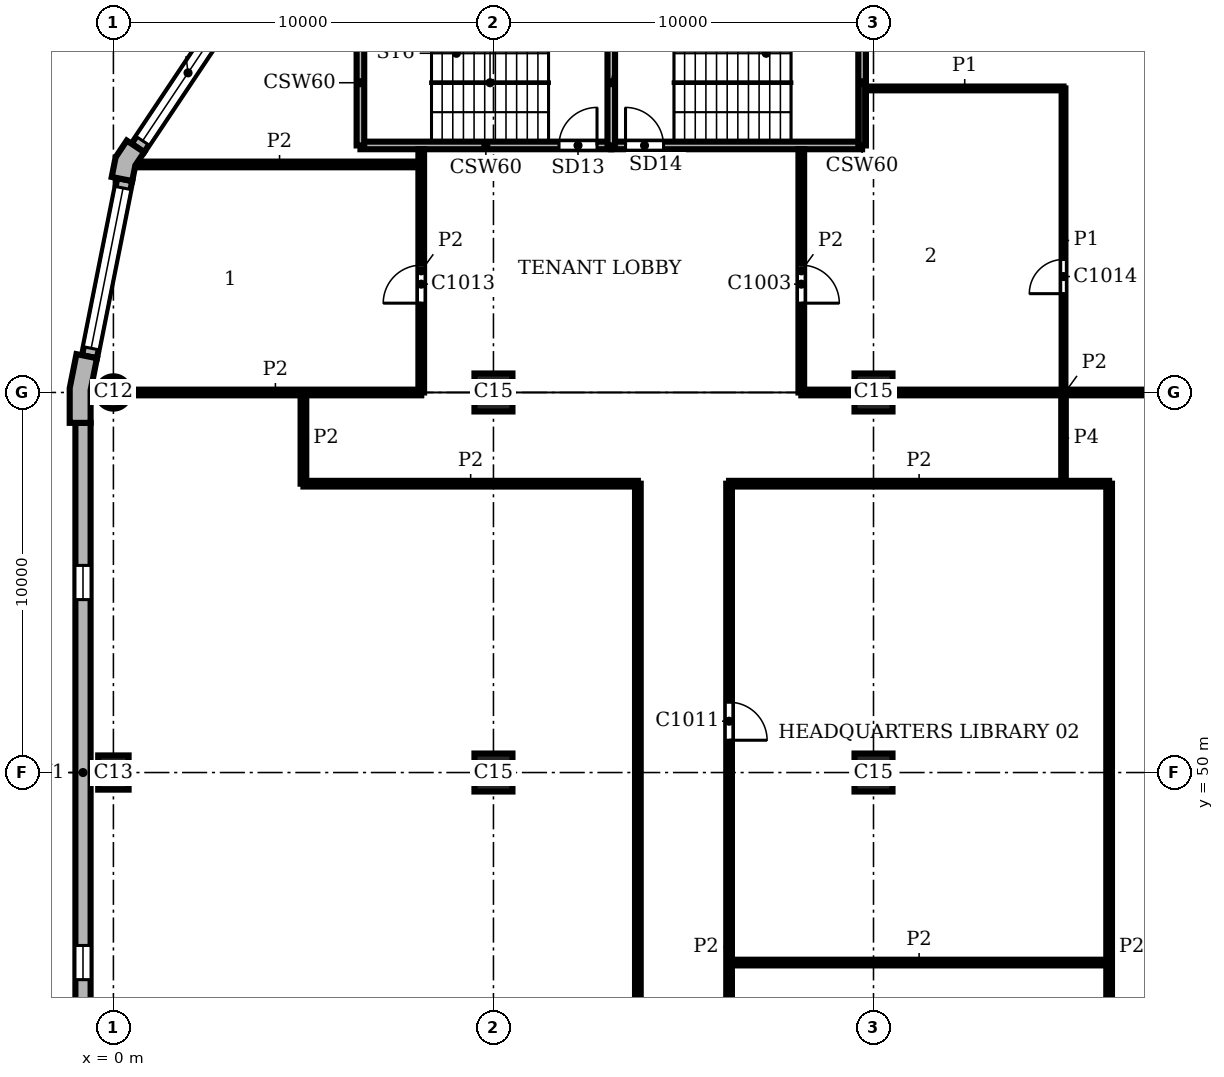
"""IFC4 building model, lengths in metres.
Left out: names, types, materials, properties, quantities, classifications, styles, units other than length and angle.
Written with IfcOpenShell. Run it as: python <this file> out.ifc"""

import sys

from ifc_helpers import new_model, si_unit, direction, frame, frame_2d, origin, origin_2d, place, context, subcontext, project, spatial, polyline, rectangle, circle, outline, extrude, element, fill, save


model = new_model("IFC4")
c1 = context("Model", 3, precision=1e-05, world=origin(), true_north=direction((0.0, 1.0)))
c2 = subcontext(c1, "Body", "Model", "MODEL_VIEW")
j1 = project(units=[si_unit("LENGTHUNIT", "METRE"), si_unit("PLANEANGLEUNIT", "RADIAN")], contexts=[c1])
p1 = place(None, origin())
s1 = spatial("IfcSite", under=j1, at=p1, CompositionType="ELEMENT")
p2 = place(p1, origin())
s2 = spatial("IfcBuilding", under=s1, at=p2, CompositionType="ELEMENT")
p3 = place(p2, frame((0.0, 0.0, 341.1)))
s3 = spatial("IfcBuildingStorey", under=s2, at=p3, CompositionType="ELEMENT", Elevation=341.1)
p4 = place(p3, frame((0.0, 60.0, 0.0), z_axis=(0.0, 0.0, 1.0), x_axis=(1.0, 0.0, 0.0)))
e1 = element("IfcColumn", 1, at=p4, inside=s3, PredefinedType="COLUMN", context=c2, shape_type="SweptSolid", body=[
    extrude(circle(Radius=0.425, at=origin_2d()), origin(), (0.0, 0.0, 1.0), 3.9),
])
p5 = place(p3, frame((0.0, 50.0, 0.0), z_axis=(0.0, 0.0, 1.0), x_axis=(0.0, 1.0, 0.0)))
e2 = element("IfcColumn", 2, at=p5, inside=s3, PredefinedType="COLUMN", context=c2, shape_type="SweptSolid", body=[
    extrude(rectangle(XDim=0.9, YDim=0.8, at=origin_2d()), origin(), (0.0, 0.0, 1.0), 3.9),
])
for number, where, z_axis, x_axis in (
    (3, (10.0, 50.0, 0.0), (0.0, 0.0, 1.0), (1.0, 0.0, 0.0)),
    (4, (10.0, 60.0, 0.0), (0.0, 0.0, 1.0), (1.0, 0.0, 0.0)),
    (5, (20.0, 50.0, 0.0), (0.0, 0.0, 1.0), (1.0, 0.0, 0.0)),
    (6, (20.0, 60.0, 0.0), (0.0, 0.0, 1.0), (1.0, 0.0, 0.0)),
):
    element("IfcColumn", number, at=place(p3, frame(where, z_axis=z_axis, x_axis=x_axis)), inside=s3, PredefinedType="COLUMN", context=c2, shape_type="SweptSolid", body=[
        extrude(rectangle(XDim=1.0, YDim=1.0, at=origin_2d()), origin(), (0.0, 0.0, 1.0), 3.9),
    ])
p6 = place(p3, origin())
e7 = element("IfcWall", 7, at=p6, inside=s3, PredefinedType="SOLIDWALL", context=c2, shape_type="SweptSolid", body=[
    extrude(outline(polyline([(0.477, 66.545), (0.352, 66.629), (0.059, 66.189), (-0.045, 65.67), (0.103, 65.641), (0.495, 65.563), (0.577, 65.974), (0.81, 66.323), (0.477, 66.545)])), origin(), (0.0, 0.0, 1.0), 3.9),
])
e8 = element("IfcWall", 8, at=p6, inside=s3, PredefinedType="SOLIDWALL", context=c2, shape_type="SweptSolid", body=[
    extrude(outline(polyline([(-0.825, 60.98), (-0.972, 61.009), (-1.15, 60.113), (-1.15, 59.2), (-1.0, 59.2), (-0.6, 59.2), (-0.6, 60.059), (-0.432, 60.902), (-0.825, 60.98)])), origin(), (0.0, 0.0, 1.0), 3.9),
])
p7 = place(p3, frame((29.357, 66.434, 0.0), z_axis=(0.0, 0.0, 1.0), x_axis=(-0.555541552266, 0.831488775454, 0.0)))
e9 = element("IfcWall", 9, at=p7, inside=s3, PredefinedType="SOLIDWALL", context=c2, shape_type="SweptSolid", body=[
    extrude(rectangle(XDim=4.753, YDim=0.4, at=frame_2d((2.376, 0.0))), origin(), (0.0, 0.0, 1.0), 3.9),
])
p8 = place(p7, frame((0.226, 0.0, 0.9)))
e10 = element("IfcOpeningElement", 10, at=p8, cuts=e9, PredefinedType="OPENING", context=c2, shape_type="SweptSolid", body=[
    extrude(rectangle(XDim=4.3, YDim=2.35, at=frame_2d((2.15, 1.175))), frame((0.0, 0.21, 0.0), z_axis=(0.0, -1.0, 0.0), x_axis=(1.0, 0.0, 0.0)), (0.0, 0.0, 1.0), 0.42),
])
p9 = place(p3, frame((3.284, 70.386, 0.0), z_axis=(0.0, 0.0, 1.0), x_axis=(-0.555541552266, -0.831488775454, 0.0)))
e11 = element("IfcWall", 11, at=p9, inside=s3, PredefinedType="SOLIDWALL", context=c2, shape_type="SweptSolid", body=[
    extrude(rectangle(XDim=4.753, YDim=0.4, at=frame_2d((2.376, 0.0))), origin(), (0.0, 0.0, 1.0), 3.9),
])
p10 = place(p9, frame((0.226, 0.0, 0.9)))
e12 = element("IfcOpeningElement", 12, at=p10, cuts=e11, PredefinedType="OPENING", context=c2, shape_type="SweptSolid", body=[
    extrude(rectangle(XDim=4.3, YDim=2.35, at=frame_2d((2.15, 1.175))), frame((0.0, 0.21, 0.0), z_axis=(0.0, -1.0, 0.0), x_axis=(1.0, 0.0, 0.0)), (0.0, 0.0, 1.0), 0.42),
])
p11 = place(p3, frame((0.299, 65.602, 0.0), z_axis=(0.0, 0.0, 1.0), x_axis=(-0.195098533057, -0.98078364709, 0.0)))
e13 = element("IfcWall", 13, at=p11, inside=s3, PredefinedType="SOLIDWALL", context=c2, shape_type="SweptSolid", body=[
    extrude(rectangle(XDim=4.753, YDim=0.4, at=frame_2d((2.376, 0.0))), origin(), (0.0, 0.0, 1.0), 3.9),
])
p12 = place(p11, frame((0.226, 0.0, 0.9)))
e14 = element("IfcOpeningElement", 14, at=p12, cuts=e13, PredefinedType="OPENING", context=c2, shape_type="SweptSolid", body=[
    extrude(rectangle(XDim=4.3, YDim=2.35, at=frame_2d((2.15, 1.175))), frame((0.0, 0.21, 0.0), z_axis=(0.0, -1.0, 0.0), x_axis=(1.0, 0.0, 0.0)), (0.0, 0.0, 1.0), 0.42),
])
p13 = place(p3, frame((-0.8, 59.2, 0.0), z_axis=(0.0, 0.0, 1.0), x_axis=(0.0, -1.0, 0.0)))
e15 = element("IfcWall", 15, at=p13, inside=s3, PredefinedType="SOLIDWALL", context=c2, shape_type="SweptSolid", body=[
    extrude(rectangle(XDim=18.4, YDim=0.4, at=frame_2d((9.2, 0.0))), origin(), (0.0, 0.0, 1.0), 3.9),
])
p14 = place(p13, frame((3.75, 0.0, 0.9)))
e16 = element("IfcOpeningElement", 16, at=p14, cuts=e15, PredefinedType="OPENING", context=c2, shape_type="SweptSolid", body=[
    extrude(rectangle(XDim=0.9, YDim=2.35, at=frame_2d((0.45, 1.175))), frame((0.0, 0.21, 0.0), z_axis=(0.0, -1.0, 0.0), x_axis=(1.0, 0.0, 0.0)), (0.0, 0.0, 1.0), 0.42),
])
p15 = place(p13, frame((13.75, 0.0, 0.9)))
e17 = element("IfcOpeningElement", 17, at=p15, cuts=e15, PredefinedType="OPENING", context=c2, shape_type="SweptSolid", body=[
    extrude(rectangle(XDim=0.9, YDim=2.35, at=frame_2d((0.45, 1.175))), frame((0.0, 0.21, 0.0), z_axis=(0.0, -1.0, 0.0), x_axis=(1.0, 0.0, 0.0)), (0.0, 0.0, 1.0), 0.42),
])
p16 = place(p3, frame((6.5, 66.5, 0.0), z_axis=(0.0, 0.0, 1.0), x_axis=(1.0, 0.0, 0.0)))
e18 = element("IfcWall", 18, at=p16, inside=s3, PredefinedType="SHEAR", context=c2, shape_type="SweptSolid", body=[
    extrude(rectangle(XDim=6.6, YDim=0.2, at=frame_2d((3.3, 0.0))), origin(), (0.0, 0.0, 1.0), 3.58),
])
p17 = place(p16, frame((5.225, 0.0, 0.0)))
e19 = element("IfcOpeningElement", 19, at=p17, cuts=e18, PredefinedType="OPENING", context=c2, shape_type="SweptSolid", body=[
    extrude(rectangle(XDim=1.0, YDim=2.1, at=frame_2d((0.5, 1.05))), frame((0.0, 0.11, 0.0), z_axis=(0.0, -1.0, 0.0), x_axis=(1.0, 0.0, 0.0)), (0.0, 0.0, 1.0), 0.22),
])
p18 = place(p3, frame((13.1, 66.5, 0.0), z_axis=(0.0, 0.0, 1.0), x_axis=(1.0, 0.0, 0.0)))
e20 = element("IfcWall", 20, at=p18, inside=s3, PredefinedType="SHEAR", context=c2, shape_type="SweptSolid", body=[
    extrude(rectangle(XDim=6.6, YDim=0.2, at=frame_2d((3.3, 0.0))), origin(), (0.0, 0.0, 1.0), 3.58),
])
p19 = place(p18, frame((0.375, 0.0, 0.0)))
e21 = element("IfcOpeningElement", 21, at=p19, cuts=e20, PredefinedType="OPENING", context=c2, shape_type="SweptSolid", body=[
    extrude(rectangle(XDim=1.0, YDim=2.1, at=frame_2d((0.5, 1.05))), frame((0.0, 0.11, 0.0), z_axis=(0.0, -1.0, 0.0), x_axis=(1.0, 0.0, 0.0)), (0.0, 0.0, 1.0), 0.22),
])
for number, where, z_axis, x_axis in (
    (22, (6.5, 66.5, 0.0), (0.0, 0.0, 1.0), (0.0, 1.0, 0.0)),
    (23, (13.1, 66.5, 0.0), (0.0, 0.0, 1.0), (0.0, 1.0, 0.0)),
    (24, (19.7, 66.5, 0.0), (0.0, 0.0, 1.0), (0.0, 1.0, 0.0)),
):
    element("IfcWall", number, at=place(p3, frame(where, z_axis=z_axis, x_axis=x_axis)), inside=s3, PredefinedType="SHEAR", context=c2, shape_type="SweptSolid", body=[
        extrude(rectangle(XDim=3.3, YDim=0.2, at=frame_2d((1.65, 0.0))), origin(), (0.0, 0.0, 1.0), 3.58),
    ])
p20 = place(p3, frame((25.0, 60.0, 0.0), z_axis=(0.0, 0.0, 1.0), x_axis=(0.0, 1.0, 0.0)))
e25 = element("IfcWall", 25, at=p20, inside=s3, PredefinedType="PARTITIONING", context=c2, shape_type="SweptSolid", body=[
    extrude(rectangle(XDim=8.0, YDim=0.1, at=frame_2d((4.0, 0.0))), origin(), (0.0, 0.0, 1.0), 3.58),
])
p21 = place(p20, frame((2.6, 0.0, 0.0)))
e26 = element("IfcOpeningElement", 26, at=p21, cuts=e25, PredefinedType="OPENING", context=c2, shape_type="SweptSolid", body=[
    extrude(rectangle(XDim=0.9, YDim=2.1, at=frame_2d((0.45, 1.05))), frame((0.0, 0.06, 0.0), z_axis=(0.0, -1.0, 0.0), x_axis=(1.0, 0.0, 0.0)), (0.0, 0.0, 1.0), 0.12),
])
p22 = place(p3, frame((19.8, 68.0, 0.0), z_axis=(0.0, 0.0, 1.0), x_axis=(1.0, 0.0, 0.0)))
e27 = element("IfcWall", 27, at=p22, inside=s3, PredefinedType="PARTITIONING", context=c2, shape_type="SweptSolid", body=[
    extrude(rectangle(XDim=5.2, YDim=0.1, at=frame_2d((2.6, 0.0))), origin(), (0.0, 0.0, 1.0), 3.58),
])
p23 = place(p3, frame((5.0, 57.6, 0.0), z_axis=(0.0, 0.0, 1.0), x_axis=(0.0, 1.0, 0.0)))
e28 = element("IfcWall", 28, at=p23, inside=s3, PredefinedType="PARTITIONING", context=c2, shape_type="SweptSolid", body=[
    extrude(rectangle(XDim=2.4, YDim=0.15, at=frame_2d((1.2, 0.0))), origin(), (0.0, 0.0, 1.0), 3.58),
])
p24 = place(p3, frame((8.1, 60.0, 0.0), z_axis=(0.0, 0.0, 1.0), x_axis=(0.0, 1.0, 0.0)))
e29 = element("IfcWall", 29, at=p24, inside=s3, PredefinedType="PARTITIONING", context=c2, shape_type="SweptSolid", body=[
    extrude(rectangle(XDim=6.4, YDim=0.15, at=frame_2d((3.2, 0.0))), origin(), (0.0, 0.0, 1.0), 3.58),
])
p25 = place(p24, frame((2.35, 0.0, 0.0)))
e30 = element("IfcOpeningElement", 30, at=p25, cuts=e29, PredefinedType="OPENING", context=c2, shape_type="SweptSolid", body=[
    extrude(rectangle(XDim=1.0, YDim=2.1, at=frame_2d((0.5, 1.05))), frame((0.0, 0.085, 0.0), z_axis=(0.0, -1.0, 0.0), x_axis=(1.0, 0.0, 0.0)), (0.0, 0.0, 1.0), 0.17),
])
p26 = place(p3, frame((13.8, 28.0, 0.0), z_axis=(0.0, 0.0, 1.0), x_axis=(0.0, 1.0, 0.0)))
e31 = element("IfcWall", 31, at=p26, inside=s3, PredefinedType="PARTITIONING", context=c2, shape_type="SweptSolid", body=[
    extrude(rectangle(XDim=29.6, YDim=0.15, at=frame_2d((14.8, 0.0))), origin(), (0.0, 0.0, 1.0), 3.58),
])
p27 = place(p26, frame((13.901, 0.0, 0.0)))
e32 = element("IfcOpeningElement", 32, at=p27, cuts=e31, PredefinedType="OPENING", context=c2, shape_type="SweptSolid", body=[
    extrude(rectangle(XDim=1.8, YDim=2.1, at=frame_2d((0.9, 1.05))), frame((0.0, 0.085, 0.0), z_axis=(0.0, -1.0, 0.0), x_axis=(1.0, 0.0, 0.0)), (0.0, 0.0, 1.0), 0.17),
])
p28 = place(p3, frame((16.2, 33.2, 0.0), z_axis=(0.0, 0.0, 1.0), x_axis=(0.0, 1.0, 0.0)))
e33 = element("IfcWall", 33, at=p28, inside=s3, PredefinedType="PARTITIONING", context=c2, shape_type="SweptSolid", body=[
    extrude(rectangle(XDim=24.4, YDim=0.15, at=frame_2d((12.2, 0.0))), origin(), (0.0, 0.0, 1.0), 3.58),
])
p29 = place(p28, frame((5.1, 0.0, 0.0)))
e34 = element("IfcOpeningElement", 34, at=p29, cuts=e33, PredefinedType="OPENING", context=c2, shape_type="SweptSolid", body=[
    extrude(rectangle(XDim=1.0, YDim=2.1, at=frame_2d((0.5, 1.05))), frame((0.0, 0.085, 0.0), z_axis=(0.0, -1.0, 0.0), x_axis=(1.0, 0.0, 0.0)), (0.0, 0.0, 1.0), 0.17),
])
p30 = place(p28, frame((17.65, 0.0, 0.0)))
e35 = element("IfcOpeningElement", 35, at=p30, cuts=e33, PredefinedType="OPENING", context=c2, shape_type="SweptSolid", body=[
    extrude(rectangle(XDim=1.0, YDim=2.1, at=frame_2d((0.5, 1.05))), frame((0.0, 0.085, 0.0), z_axis=(0.0, -1.0, 0.0), x_axis=(1.0, 0.0, 0.0)), (0.0, 0.0, 1.0), 0.17),
])
p31 = place(p3, frame((18.1, 60.0, 0.0), z_axis=(0.0, 0.0, 1.0), x_axis=(0.0, 1.0, 0.0)))
e36 = element("IfcWall", 36, at=p31, inside=s3, PredefinedType="PARTITIONING", context=c2, shape_type="SweptSolid", body=[
    extrude(rectangle(XDim=6.4, YDim=0.15, at=frame_2d((3.2, 0.0))), origin(), (0.0, 0.0, 1.0), 3.58),
])
p32 = place(p31, frame((2.35, 0.0, 0.0)))
e37 = element("IfcOpeningElement", 37, at=p32, cuts=e36, PredefinedType="OPENING", context=c2, shape_type="SweptSolid", body=[
    extrude(rectangle(XDim=1.0, YDim=2.1, at=frame_2d((0.5, 1.05))), frame((0.0, 0.085, 0.0), z_axis=(0.0, -1.0, 0.0), x_axis=(1.0, 0.0, 0.0)), (0.0, 0.0, 1.0), 0.17),
])
p33 = place(p3, frame((26.2, 33.2, 0.0), z_axis=(0.0, 0.0, 1.0), x_axis=(0.0, 1.0, 0.0)))
e38 = element("IfcWall", 38, at=p33, inside=s3, PredefinedType="PARTITIONING", context=c2, shape_type="SweptSolid", body=[
    extrude(rectangle(XDim=24.4, YDim=0.15, at=frame_2d((12.2, 0.0))), origin(), (0.0, 0.0, 1.0), 3.58),
])
p34 = place(p3, frame((16.2, 45.0, 0.0), z_axis=(0.0, 0.0, 1.0), x_axis=(1.0, 0.0, 0.0)))
e39 = element("IfcWall", 39, at=p34, inside=s3, PredefinedType="PARTITIONING", context=c2, shape_type="SweptSolid", body=[
    extrude(rectangle(XDim=10.0, YDim=0.15, at=frame_2d((5.0, 0.0))), origin(), (0.0, 0.0, 1.0), 3.58),
])
p35 = place(p3, frame((5.0, 57.6, 0.0), z_axis=(0.0, 0.0, 1.0), x_axis=(1.0, 0.0, 0.0)))
e40 = element("IfcWall", 40, at=p35, inside=s3, PredefinedType="PARTITIONING", context=c2, shape_type="SweptSolid", body=[
    extrude(rectangle(XDim=8.8, YDim=0.15, at=frame_2d((4.4, 0.0))), origin(), (0.0, 0.0, 1.0), 3.58),
])
p36 = place(p3, frame((16.2, 57.6, 0.0), z_axis=(0.0, 0.0, 1.0), x_axis=(1.0, 0.0, 0.0)))
e41 = element("IfcWall", 41, at=p36, inside=s3, PredefinedType="PARTITIONING", context=c2, shape_type="SweptSolid", body=[
    extrude(rectangle(XDim=10.0, YDim=0.15, at=frame_2d((5.0, 0.0))), origin(), (0.0, 0.0, 1.0), 3.58),
])
p37 = place(p3, frame((0.425, 60.0, 0.0), z_axis=(0.0, 0.0, 1.0), x_axis=(1.0, 0.0, 0.0)))
e42 = element("IfcWall", 42, at=p37, inside=s3, PredefinedType="PARTITIONING", context=c2, shape_type="SweptSolid", body=[
    extrude(rectangle(XDim=7.675, YDim=0.15, at=frame_2d((3.837, 0.0))), origin(), (0.0, 0.0, 1.0), 3.58),
])
p38 = place(p3, frame((18.1, 60.0, 0.0), z_axis=(0.0, 0.0, 1.0), x_axis=(1.0, 0.0, 0.0)))
e43 = element("IfcWall", 43, at=p38, inside=s3, PredefinedType="PARTITIONING", context=c2, shape_type="SweptSolid", body=[
    extrude(rectangle(XDim=1.4, YDim=0.15, at=frame_2d((0.7, 0.0))), origin(), (0.0, 0.0, 1.0), 3.58),
])
p39 = place(p3, frame((20.5, 60.0, 0.0), z_axis=(0.0, 0.0, 1.0), x_axis=(1.0, 0.0, 0.0)))
e44 = element("IfcWall", 44, at=p39, inside=s3, PredefinedType="PARTITIONING", context=c2, shape_type="SweptSolid", body=[
    extrude(rectangle(XDim=9.075, YDim=0.15, at=frame_2d((4.538, 0.0))), origin(), (0.0, 0.0, 1.0), 3.58),
])
p40 = place(p3, frame((0.644, 66.0, 0.0), z_axis=(0.0, 0.0, 1.0), x_axis=(1.0, 0.0, 0.0)))
e45 = element("IfcWall", 45, at=p40, inside=s3, PredefinedType="PARTITIONING", context=c2, shape_type="SweptSolid", body=[
    extrude(rectangle(XDim=7.456, YDim=0.15, at=frame_2d((3.728, 0.0))), origin(), (0.0, 0.0, 1.0), 3.58),
])
p41 = place(p3, frame((25.0, 57.6, 0.0), z_axis=(0.0, 0.0, 1.0), x_axis=(0.0, 1.0, 0.0)))
e46 = element("IfcWall", 46, at=p41, inside=s3, PredefinedType="PARTITIONING", context=c2, shape_type="SweptSolid", body=[
    extrude(rectangle(XDim=2.4, YDim=0.12, at=frame_2d((1.2, 0.0))), origin(), (0.0, 0.0, 1.0), 3.58),
])
p42 = place(p8, origin())
e47 = element("IfcWindow", 47, at=p42, inside=s3, PartitioningType="SINGLE_PANEL", PredefinedType="WINDOW", context=c2, shape_type="SweptSolid", body=[
    extrude(rectangle(XDim=4.3, YDim=2.35, at=frame_2d((2.15, 1.175))), frame((0.0, 0.16, 0.0), z_axis=(0.0, -1.0, 0.0), x_axis=(1.0, 0.0, 0.0)), (0.0, 0.0, 1.0), 0.06),
])
fill(e10, e47)
p43 = place(p10, origin())
e48 = element("IfcWindow", 48, at=p43, inside=s3, PartitioningType="SINGLE_PANEL", PredefinedType="WINDOW", context=c2, shape_type="SweptSolid", body=[
    extrude(rectangle(XDim=4.3, YDim=2.35, at=frame_2d((2.15, 1.175))), frame((0.0, 0.16, 0.0), z_axis=(0.0, -1.0, 0.0), x_axis=(1.0, 0.0, 0.0)), (0.0, 0.0, 1.0), 0.06),
])
fill(e12, e48)
p44 = place(p12, origin())
e49 = element("IfcWindow", 49, at=p44, inside=s3, PartitioningType="SINGLE_PANEL", PredefinedType="WINDOW", context=c2, shape_type="SweptSolid", body=[
    extrude(rectangle(XDim=4.3, YDim=2.35, at=frame_2d((2.15, 1.175))), frame((0.0, 0.16, 0.0), z_axis=(0.0, -1.0, 0.0), x_axis=(1.0, 0.0, 0.0)), (0.0, 0.0, 1.0), 0.06),
])
fill(e14, e49)
p45 = place(p14, origin())
e50 = element("IfcWindow", 50, at=p45, inside=s3, PartitioningType="SINGLE_PANEL", PredefinedType="WINDOW", context=c2, shape_type="SweptSolid", body=[
    extrude(rectangle(XDim=0.9, YDim=2.35, at=frame_2d((0.45, 1.175))), frame((0.0, 0.16, 0.0), z_axis=(0.0, -1.0, 0.0), x_axis=(1.0, 0.0, 0.0)), (0.0, 0.0, 1.0), 0.06),
])
fill(e16, e50)
p46 = place(p15, origin())
e51 = element("IfcWindow", 51, at=p46, inside=s3, PartitioningType="SINGLE_PANEL", PredefinedType="WINDOW", context=c2, shape_type="SweptSolid", body=[
    extrude(rectangle(XDim=0.9, YDim=2.35, at=frame_2d((0.45, 1.175))), frame((0.0, 0.16, 0.0), z_axis=(0.0, -1.0, 0.0), x_axis=(1.0, 0.0, 0.0)), (0.0, 0.0, 1.0), 0.06),
])
fill(e17, e51)
p47 = place(p17, origin())
e52 = element("IfcDoor", 52, at=p47, inside=s3, OperationType="SINGLE_SWING_RIGHT", PredefinedType="DOOR", context=c2, shape_type="SweptSolid", body=[
    extrude(rectangle(XDim=1.0, YDim=2.1, at=frame_2d((0.5, 1.05))), frame((0.0, 0.025, 0.0), z_axis=(0.0, -1.0, 0.0), x_axis=(1.0, 0.0, 0.0)), (0.0, 0.0, 1.0), 0.05),
])
fill(e19, e52)
p48 = place(p19, origin())
e53 = element("IfcDoor", 53, at=p48, inside=s3, OperationType="SINGLE_SWING_LEFT", PredefinedType="DOOR", context=c2, shape_type="SweptSolid", body=[
    extrude(rectangle(XDim=1.0, YDim=2.1, at=frame_2d((0.5, 1.05))), frame((0.0, 0.025, 0.0), z_axis=(0.0, -1.0, 0.0), x_axis=(1.0, 0.0, 0.0)), (0.0, 0.0, 1.0), 0.05),
])
fill(e21, e53)
p49 = place(p32, frame((1.0, 0.0, 0.0), z_axis=(0.0, 0.0, 1.0), x_axis=(-1.0, 0.0, 0.0)))
e54 = element("IfcDoor", 54, at=p49, inside=s3, OperationType="SINGLE_SWING_RIGHT", PredefinedType="DOOR", context=c2, shape_type="SweptSolid", body=[
    extrude(rectangle(XDim=1.0, YDim=2.1, at=frame_2d((0.5, 1.05))), frame((0.0, 0.025, 0.0), z_axis=(0.0, -1.0, 0.0), x_axis=(1.0, 0.0, 0.0)), (0.0, 0.0, 1.0), 0.05),
])
fill(e37, e54)
p50 = place(p30, frame((1.0, 0.0, 0.0), z_axis=(0.0, 0.0, 1.0), x_axis=(-1.0, 0.0, 0.0)))
e55 = element("IfcDoor", 55, at=p50, inside=s3, OperationType="SINGLE_SWING_RIGHT", PredefinedType="DOOR", context=c2, shape_type="SweptSolid", body=[
    extrude(rectangle(XDim=1.0, YDim=2.1, at=frame_2d((0.5, 1.05))), frame((0.0, 0.025, 0.0), z_axis=(0.0, -1.0, 0.0), x_axis=(1.0, 0.0, 0.0)), (0.0, 0.0, 1.0), 0.05),
])
fill(e35, e55)
p51 = place(p25, origin())
e56 = element("IfcDoor", 56, at=p51, inside=s3, OperationType="SINGLE_SWING_LEFT", PredefinedType="DOOR", context=c2, shape_type="SweptSolid", body=[
    extrude(rectangle(XDim=1.0, YDim=2.1, at=frame_2d((0.5, 1.05))), frame((0.0, 0.025, 0.0), z_axis=(0.0, -1.0, 0.0), x_axis=(1.0, 0.0, 0.0)), (0.0, 0.0, 1.0), 0.05),
])
fill(e30, e56)
p52 = place(p21, origin())
e57 = element("IfcDoor", 57, at=p52, inside=s3, OperationType="SINGLE_SWING_LEFT", PredefinedType="DOOR", context=c2, shape_type="SweptSolid", body=[
    extrude(rectangle(XDim=0.9, YDim=2.1, at=frame_2d((0.45, 1.05))), frame((0.0, 0.025, 0.0), z_axis=(0.0, -1.0, 0.0), x_axis=(1.0, 0.0, 0.0)), (0.0, 0.0, 1.0), 0.05),
])
fill(e26, e57)
save(model, sys.argv[1])
